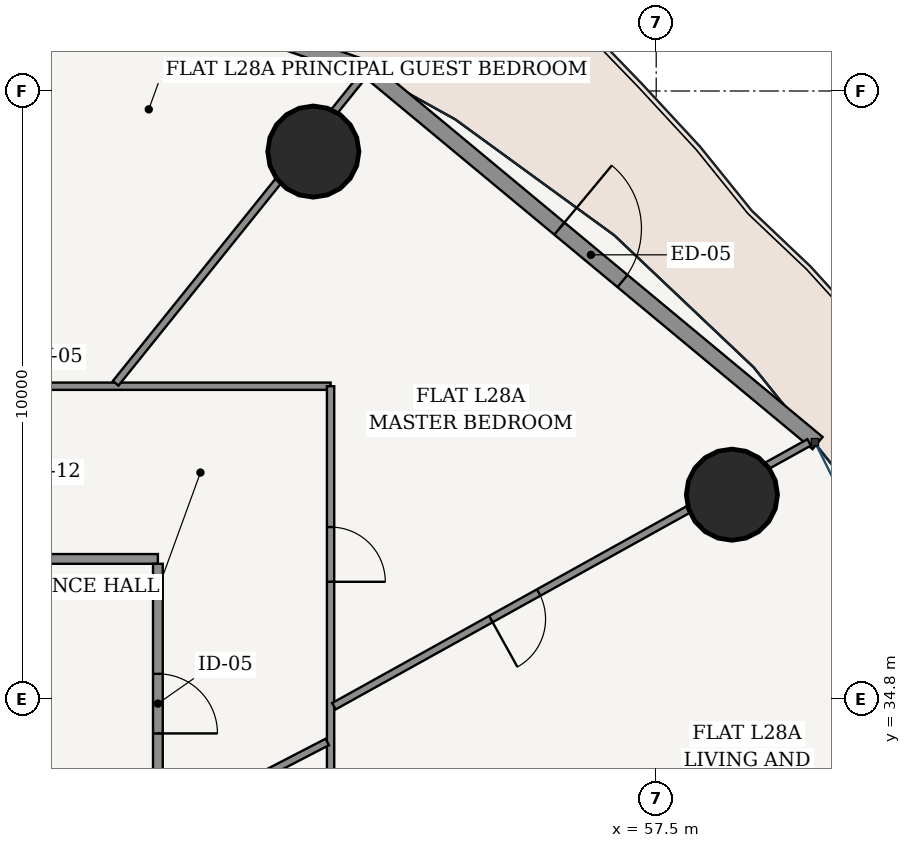
"""IFC4 building model, lengths in metres.
Left out: names, types, materials, properties, quantities, classifications, styles, units other than length and angle.
Written with IfcOpenShell. Run it as: python <this file> out.ifc"""

import sys

from ifc_helpers import new_model, si_unit, direction, frame, frame_2d, origin, origin_2d, place, context, subcontext, project, spatial, rectangle, hollow_circle, extrude, source, transform, mapped, element, fill, save


model = new_model("IFC4")
c1 = context("Model", 3, precision=1e-05, world=origin(), true_north=direction((-0.2419218956, 0.970295726276)))
c2 = subcontext(c1, "Body", "Model", "MODEL_VIEW")
j1 = project(units=[si_unit("LENGTHUNIT", "METRE"), si_unit("PLANEANGLEUNIT", "RADIAN")], contexts=[c1])
p1 = place(None, origin())
s1 = spatial("IfcSite", under=j1, at=p1, CompositionType="ELEMENT")
p2 = place(p1, origin())
s2 = spatial("IfcBuilding", under=s1, at=p2, CompositionType="ELEMENT")
p3 = place(p2, frame((0.0, 0.0, 108.6)))
s3 = spatial("IfcBuildingStorey", under=s2, at=p3, CompositionType="ELEMENT", Elevation=108.6)
for number, where, z_axis, x_axis in (
    (1, (58.745, 38.161, 0.0), (0.0, 0.0, 1.0), (1.0, 0.0, 0.0)),
    (2, (51.862, 43.803, 0.0), (0.0, 0.0, 1.0), (1.0, 0.0, 0.0)),
):
    element("IfcColumn", number, at=place(p3, frame(where, z_axis=z_axis, x_axis=x_axis)), inside=s3, PredefinedType="COLUMN", context=c2, shape_type="SweptSolid", body=[
        extrude(hollow_circle(Radius=0.75, WallThickness=0.045, at=origin_2d()), origin(), (0.0, 0.0, 1.0), 3.6),
    ])
p4 = place(p3, frame((60.154, 39.01, 0.0), z_axis=(0.0, 0.0, 1.0), x_axis=(-0.769242574941, 0.638956853706, 0.0)))
e3 = element("IfcWall", 3, at=p4, inside=s3, PredefinedType="SOLIDWALL", context=c2, shape_type="SweptSolid", body=[
    extrude(rectangle(XDim=9.69, YDim=0.26, at=frame_2d((4.845, 0.0))), origin(), (0.0, 0.0, 1.0), 3.325),
])
p5 = place(p4, frame((4.17, 0.0, 0.0)))
e4 = element("IfcOpeningElement", 4, at=p5, cuts=e3, PredefinedType="OPENING", context=c2, shape_type="SweptSolid", body=[
    extrude(rectangle(XDim=1.35, YDim=2.2, at=frame_2d((0.675, 1.1))), frame((0.0, 0.14, 0.0), z_axis=(0.0, -1.0, 0.0), x_axis=(1.0, 0.0, 0.0)), (0.0, 0.0, 1.0), 0.28),
])
p6 = place(p3, frame((52.837, 45.125, 0.0), z_axis=(0.0, 0.0, 1.0), x_axis=(-0.945597432299, 0.325339047809, 0.0)))
e5 = element("IfcWall", 5, at=p6, inside=s3, PredefinedType="SOLIDWALL", context=c2, shape_type="SweptSolid", body=[
    extrude(rectangle(XDim=10.289, YDim=0.28, at=frame_2d((5.145, 0.0))), origin(), (0.0, 0.0, 1.0), 3.325),
])
p7 = place(p6, frame((1.728, 0.0, 0.85)))
e6 = element("IfcOpeningElement", 6, at=p7, cuts=e5, PredefinedType="OPENING", context=c2, shape_type="SweptSolid", body=[
    extrude(rectangle(XDim=2.1, YDim=1.95, at=frame_2d((1.05, 0.975))), frame((0.0, 0.15, 0.0), z_axis=(0.0, -1.0, 0.0), x_axis=(1.0, 0.0, 0.0)), (0.0, 0.0, 1.0), 0.3),
])
p8 = place(p6, frame((6.461, 0.0, 0.85)))
e7 = element("IfcOpeningElement", 7, at=p8, cuts=e5, PredefinedType="OPENING", context=c2, shape_type="SweptSolid", body=[
    extrude(rectangle(XDim=2.1, YDim=1.95, at=frame_2d((1.05, 0.975))), frame((0.0, 0.15, 0.0), z_axis=(0.0, -1.0, 0.0), x_axis=(1.0, 0.0, 0.0)), (0.0, 0.0, 1.0), 0.3),
])
p9 = place(p3, frame((26.695, 37.105, 0.0), z_axis=(0.0, 0.0, 1.0), x_axis=(1.0, 0.0, 0.0)))
e8 = element("IfcWall", 8, at=p9, inside=s3, PredefinedType="PARTITIONING", context=c2, shape_type="SweptSolid", body=[
    extrude(rectangle(XDim=22.61, YDim=0.16, at=frame_2d((11.305, 0.0))), origin(), (0.0, 0.0, 1.0), 2.767),
])
p10 = place(p9, frame((4.925, 0.0, 0.0)))
e9 = element("IfcOpeningElement", 9, at=p10, cuts=e8, PredefinedType="OPENING", context=c2, shape_type="SweptSolid", body=[
    extrude(rectangle(XDim=0.98, YDim=2.2, at=frame_2d((0.49, 1.1))), frame((0.0, 0.09, 0.0), z_axis=(0.0, -1.0, 0.0), x_axis=(1.0, 0.0, 0.0)), (0.0, 0.0, 1.0), 0.18),
])
p11 = place(p3, frame((49.305, 16.575, 0.0), z_axis=(0.0, 0.0, 1.0), x_axis=(0.0, 1.0, 0.0)))
e10 = element("IfcWall", 10, at=p11, inside=s3, PredefinedType="PARTITIONING", context=c2, shape_type="SweptSolid", body=[
    extrude(rectangle(XDim=20.45, YDim=0.16, at=frame_2d((10.225, 0.0))), origin(), (0.0, 0.0, 1.0), 2.767),
])
p12 = place(p11, frame((17.66, 0.0, 0.0)))
e11 = element("IfcOpeningElement", 11, at=p12, cuts=e10, PredefinedType="OPENING", context=c2, shape_type="SweptSolid", body=[
    extrude(rectangle(XDim=0.98, YDim=2.2, at=frame_2d((0.49, 1.1))), frame((0.0, 0.09, 0.0), z_axis=(0.0, -1.0, 0.0), x_axis=(1.0, 0.0, 0.0)), (0.0, 0.0, 1.0), 0.18),
])
p13 = place(p3, frame((41.249, 39.945, 0.0), z_axis=(0.0, 0.0, 1.0), x_axis=(1.0, 0.0, 0.0)))
e12 = element("IfcWall", 12, at=p13, inside=s3, PredefinedType="PARTITIONING", context=c2, shape_type="SweptSolid", body=[
    extrude(rectangle(XDim=10.896, YDim=0.12, at=frame_2d((5.448, 0.0))), origin(), (0.0, 0.0, 1.0), 2.767),
])
p14 = place(p13, frame((1.336, 0.0, 0.0)))
e13 = element("IfcOpeningElement", 13, at=p14, cuts=e12, PredefinedType="OPENING", context=c2, shape_type="SweptSolid", body=[
    extrude(rectangle(XDim=0.9, YDim=2.15, at=frame_2d((0.45, 1.075))), frame((0.0, 0.07, 0.0), z_axis=(0.0, -1.0, 0.0), x_axis=(1.0, 0.0, 0.0)), (0.0, 0.0, 1.0), 0.14),
])
p15 = place(p3, frame((52.145, 39.945, 0.0), z_axis=(0.0, 0.0, 1.0), x_axis=(0.0, -1.0, 0.0)))
e14 = element("IfcWall", 14, at=p15, inside=s3, PredefinedType="PARTITIONING", context=c2, shape_type="SweptSolid", body=[
    extrude(rectangle(XDim=10.705, YDim=0.12, at=frame_2d((5.353, 0.0))), origin(), (0.0, 0.0, 1.0), 2.767),
])
p16 = place(p15, frame((2.316, 0.0, 0.0)))
e15 = element("IfcOpeningElement", 15, at=p16, cuts=e14, PredefinedType="OPENING", context=c2, shape_type="SweptSolid", body=[
    extrude(rectangle(XDim=0.9, YDim=2.15, at=frame_2d((0.45, 1.075))), frame((0.0, 0.07, 0.0), z_axis=(0.0, -1.0, 0.0), x_axis=(1.0, 0.0, 0.0)), (0.0, 0.0, 1.0), 0.14),
])
p17 = place(p3, frame((52.199, 34.683, 0.0), z_axis=(0.0, 0.0, 1.0), x_axis=(0.874320827228, 0.485348422349, 0.0)))
e16 = element("IfcWall", 16, at=p17, inside=s3, PredefinedType="PARTITIONING", context=c2, shape_type="SweptSolid", body=[
    extrude(rectangle(XDim=8.94, YDim=0.12, at=frame_2d((4.47, 0.0))), origin(), (0.0, 0.0, 1.0), 2.767),
])
p18 = place(p17, frame((2.953, 0.0, 0.0)))
e17 = element("IfcOpeningElement", 17, at=p18, cuts=e16, PredefinedType="OPENING", context=c2, shape_type="SweptSolid", body=[
    extrude(rectangle(XDim=0.9, YDim=2.15, at=frame_2d((0.45, 1.075))), frame((0.0, 0.07, 0.0), z_axis=(0.0, -1.0, 0.0), x_axis=(1.0, 0.0, 0.0)), (0.0, 0.0, 1.0), 0.14),
])
p19 = place(p3, frame((48.611, 39.993, 0.0), z_axis=(0.0, 0.0, 1.0), x_axis=(0.626719700294, 0.779244773651, 0.0)))
e18 = element("IfcWall", 18, at=p19, inside=s3, PredefinedType="PARTITIONING", context=c2, shape_type="SweptSolid", body=[
    extrude(rectangle(XDim=6.537, YDim=0.12, at=frame_2d((3.269, 0.0))), origin(), (0.0, 0.0, 1.0), 2.767),
])
p20 = place(p3, frame((44.581, 40.0, 0.0), z_axis=(0.0, 0.0, 1.0), x_axis=(0.446188142997, 0.894939182877, 0.0)))
e19 = element("IfcWall", 19, at=p20, inside=s3, PredefinedType="PARTITIONING", context=c2, shape_type="SweptSolid", body=[
    extrude(rectangle(XDim=8.002, YDim=0.12, at=frame_2d((4.001, 0.0))), origin(), (0.0, 0.0, 1.0), 2.767),
])
p21 = place(p20, frame((3.551, 0.0, 0.0)))
e20 = element("IfcOpeningElement", 20, at=p21, cuts=e19, PredefinedType="OPENING", context=c2, shape_type="SweptSolid", body=[
    extrude(rectangle(XDim=0.9, YDim=2.15, at=frame_2d((0.45, 1.075))), frame((0.0, 0.07, 0.0), z_axis=(0.0, -1.0, 0.0), x_axis=(1.0, 0.0, 0.0)), (0.0, 0.0, 1.0), 0.14),
])
p22 = place(p3, frame((49.387, 32.695, 0.0), z_axis=(0.0, 0.0, 1.0), x_axis=(0.888050549489, 0.459745822767, 0.0)))
e21 = element("IfcWall", 21, at=p22, inside=s3, PredefinedType="PARTITIONING", context=c2, shape_type="SweptSolid", body=[
    extrude(rectangle(XDim=3.044, YDim=0.12, at=frame_2d((1.522, 0.0))), origin(), (0.0, 0.0, 1.0), 3.325),
])
p23 = place(p22, frame((1.092, 0.0, 0.0)))
e22 = element("IfcOpeningElement", 22, at=p23, cuts=e21, PredefinedType="OPENING", context=c2, shape_type="SweptSolid", body=[
    extrude(rectangle(XDim=0.86, YDim=2.15, at=frame_2d((0.43, 1.075))), frame((0.0, 0.07, 0.0), z_axis=(0.0, -1.0, 0.0), x_axis=(1.0, 0.0, 0.0)), (0.0, 0.0, 1.0), 0.14),
])
m1 = source(origin(), c2, "Body", "SweptSolid", [
    extrude(rectangle(XDim=1.35, YDim=2.2, at=frame_2d((0.675, 1.1))), frame((0.0, 0.025, 0.0), z_axis=(0.0, -1.0, 0.0), x_axis=(1.0, 0.0, 0.0)), (0.0, 0.0, 1.0), 0.05),
])
p24 = place(p5, frame((1.35, 0.0, 0.0), z_axis=(0.0, 0.0, 1.0), x_axis=(-1.0, 0.0, 0.0)))
e23 = element("IfcDoor", 23, at=p24, inside=s3, OperationType="SINGLE_SWING_LEFT", PredefinedType="DOOR", context=c2, shape_type="MappedRepresentation", body=[
    mapped(m1, transform((0.0, 0.0, 0.0), scale=1.0)),
])
fill(e4, e23)
m2 = source(origin(), c2, "Body", "SweptSolid", [
    extrude(rectangle(XDim=0.98, YDim=2.2, at=frame_2d((0.49, 1.1))), frame((0.0, 0.025, 0.0), z_axis=(0.0, -1.0, 0.0), x_axis=(1.0, 0.0, 0.0)), (0.0, 0.0, 1.0), 0.05),
])
p25 = place(p12, frame((0.98, 0.0, 0.0), z_axis=(0.0, 0.0, 1.0), x_axis=(-1.0, 0.0, 0.0)))
e24 = element("IfcDoor", 24, at=p25, inside=s3, OperationType="SINGLE_SWING_RIGHT", PredefinedType="DOOR", context=c2, shape_type="MappedRepresentation", body=[
    mapped(m2, transform((0.0, 0.0, 0.0), scale=1.0)),
])
fill(e11, e24)
m3 = source(origin(), c2, "Body", "SweptSolid", [
    extrude(rectangle(XDim=0.9, YDim=2.15, at=frame_2d((0.45, 1.075))), frame((0.0, 0.025, 0.0), z_axis=(0.0, -1.0, 0.0), x_axis=(1.0, 0.0, 0.0)), (0.0, 0.0, 1.0), 0.05),
])
p26 = place(p16, origin())
e25 = element("IfcDoor", 25, at=p26, inside=s3, OperationType="SINGLE_SWING_RIGHT", PredefinedType="DOOR", context=c2, shape_type="MappedRepresentation", body=[
    mapped(m3, transform((0.0, 0.0, 0.0), scale=1.0)),
])
fill(e15, e25)
p27 = place(p18, frame((0.9, 0.0, 0.0), z_axis=(0.0, 0.0, 1.0), x_axis=(-1.0, 0.0, 0.0)))
e26 = element("IfcDoor", 26, at=p27, inside=s3, OperationType="SINGLE_SWING_RIGHT", PredefinedType="DOOR", context=c2, shape_type="MappedRepresentation", body=[
    mapped(m3, transform((0.0, 0.0, 0.0), scale=1.0)),
])
fill(e17, e26)
save(model, sys.argv[1])
